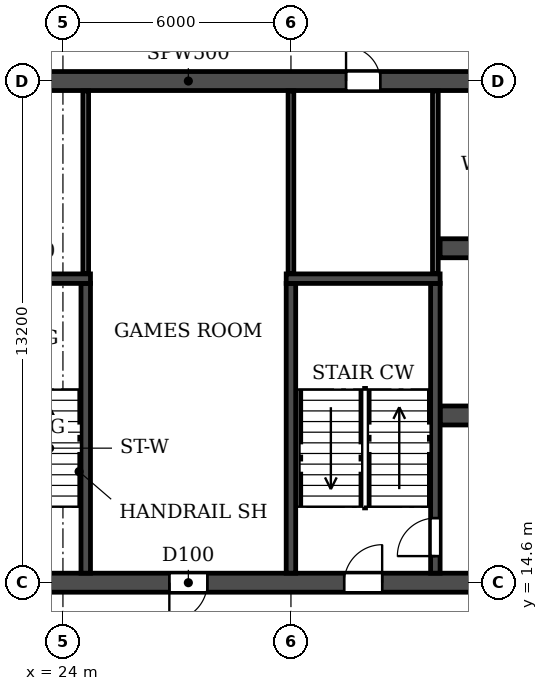
"""IFC4 building model, lengths in metres.
Left out: names, types, materials, properties, quantities, classifications, styles, units other than length and angle.
Written with IfcOpenShell. Run it as: python <this file> out.ifc"""

import sys

from ifc_helpers import new_model, si_unit, direction, frame, frame_2d, origin, place, context, subcontext, project, spatial, rectangle, extrude, element, fill, save


model = new_model("IFC4")
c1 = context("Model", 3, precision=1e-05, world=origin(), true_north=direction((0.0, 1.0)))
c2 = subcontext(c1, "Body", "Model", "MODEL_VIEW")
j1 = project(units=[si_unit("LENGTHUNIT", "METRE"), si_unit("PLANEANGLEUNIT", "RADIAN")], contexts=[c1])
p1 = place(None, origin())
s1 = spatial("IfcSite", under=j1, at=p1, CompositionType="ELEMENT")
p2 = place(p1, origin())
s2 = spatial("IfcBuilding", under=s1, at=p2, CompositionType="ELEMENT")
p3 = place(p2, frame((0.0, 0.0, 82.8)))
s3 = spatial("IfcBuildingStorey", under=s2, at=p3, CompositionType="ELEMENT", Elevation=82.8)
p4 = place(p3, frame((8.6, 14.6, 0.0), z_axis=(0.0, 0.0, 1.0), x_axis=(1.0, 0.0, 0.0)))
e1 = element("IfcWall", 1, at=p4, inside=s3, PredefinedType="SOLIDWALL", context=c2, shape_type="SweptSolid", body=[
    extrude(rectangle(XDim=84.8, YDim=0.5, at=frame_2d((42.4, 0.0))), origin(), (0.0, 0.0, 1.0), 3.06),
])
p5 = place(p4, frame((1.2, 0.0, 0.0)))
e2 = element("IfcOpeningElement", 2, at=p5, cuts=e1, PredefinedType="OPENING", context=c2, shape_type="SweptSolid", body=[
    extrude(rectangle(XDim=1.0, YDim=2.1, at=frame_2d((0.5, 1.05))), frame((0.0, 0.26, 0.0), z_axis=(0.0, -1.0, 0.0), x_axis=(1.0, 0.0, 0.0)), (0.0, 0.0, 1.0), 0.52),
])
p6 = place(p4, frame((5.9, 0.0, 0.0)))
e3 = element("IfcOpeningElement", 3, at=p6, cuts=e1, PredefinedType="OPENING", context=c2, shape_type="SweptSolid", body=[
    extrude(rectangle(XDim=1.0, YDim=2.1, at=frame_2d((0.5, 1.05))), frame((0.0, 0.26, 0.0), z_axis=(0.0, -1.0, 0.0), x_axis=(1.0, 0.0, 0.0)), (0.0, 0.0, 1.0), 0.52),
])
p7 = place(p4, frame((10.3, 0.0, 0.0)))
e4 = element("IfcOpeningElement", 4, at=p7, cuts=e1, PredefinedType="OPENING", context=c2, shape_type="SweptSolid", body=[
    extrude(rectangle(XDim=1.0, YDim=2.1, at=frame_2d((0.5, 1.05))), frame((0.0, 0.26, 0.0), z_axis=(0.0, -1.0, 0.0), x_axis=(1.0, 0.0, 0.0)), (0.0, 0.0, 1.0), 0.52),
])
p8 = place(p4, frame((18.2, 0.0, 0.0)))
e5 = element("IfcOpeningElement", 5, at=p8, cuts=e1, PredefinedType="OPENING", context=c2, shape_type="SweptSolid", body=[
    extrude(rectangle(XDim=1.0, YDim=2.1, at=frame_2d((0.5, 1.05))), frame((0.0, 0.26, 0.0), z_axis=(0.0, -1.0, 0.0), x_axis=(1.0, 0.0, 0.0)), (0.0, 0.0, 1.0), 0.52),
])
p9 = place(p4, frame((22.8, 0.0, 0.0)))
e6 = element("IfcOpeningElement", 6, at=p9, cuts=e1, PredefinedType="OPENING", context=c2, shape_type="SweptSolid", body=[
    extrude(rectangle(XDim=1.0, YDim=2.1, at=frame_2d((0.5, 1.05))), frame((0.0, 0.26, 0.0), z_axis=(0.0, -1.0, 0.0), x_axis=(1.0, 0.0, 0.0)), (0.0, 0.0, 1.0), 0.52),
])
p10 = place(p4, frame((36.7, 0.0, 0.0)))
e7 = element("IfcOpeningElement", 7, at=p10, cuts=e1, PredefinedType="OPENING", context=c2, shape_type="SweptSolid", body=[
    extrude(rectangle(XDim=1.0, YDim=2.1, at=frame_2d((0.5, 1.05))), frame((0.0, 0.26, 0.0), z_axis=(0.0, -1.0, 0.0), x_axis=(1.0, 0.0, 0.0)), (0.0, 0.0, 1.0), 0.52),
])
p11 = place(p4, frame((41.9, 0.0, 0.0)))
e8 = element("IfcOpeningElement", 8, at=p11, cuts=e1, PredefinedType="OPENING", context=c2, shape_type="SweptSolid", body=[
    extrude(rectangle(XDim=1.0, YDim=2.1, at=frame_2d((0.5, 1.05))), frame((0.0, 0.26, 0.0), z_axis=(0.0, -1.0, 0.0), x_axis=(1.0, 0.0, 0.0)), (0.0, 0.0, 1.0), 0.52),
])
p12 = place(p4, frame((44.5, 0.0, 0.0)))
e9 = element("IfcOpeningElement", 9, at=p12, cuts=e1, PredefinedType="OPENING", context=c2, shape_type="SweptSolid", body=[
    extrude(rectangle(XDim=1.0, YDim=2.1, at=frame_2d((0.5, 1.05))), frame((0.0, 0.26, 0.0), z_axis=(0.0, -1.0, 0.0), x_axis=(1.0, 0.0, 0.0)), (0.0, 0.0, 1.0), 0.52),
])
p13 = place(p4, frame((48.4, 0.0, 0.0)))
e10 = element("IfcOpeningElement", 10, at=p13, cuts=e1, PredefinedType="OPENING", context=c2, shape_type="SweptSolid", body=[
    extrude(rectangle(XDim=1.0, YDim=2.1, at=frame_2d((0.5, 1.05))), frame((0.0, 0.26, 0.0), z_axis=(0.0, -1.0, 0.0), x_axis=(1.0, 0.0, 0.0)), (0.0, 0.0, 1.0), 0.52),
])
p14 = place(p4, frame((61.0, 0.0, 0.0)))
e11 = element("IfcOpeningElement", 11, at=p14, cuts=e1, PredefinedType="OPENING", context=c2, shape_type="SweptSolid", body=[
    extrude(rectangle(XDim=1.0, YDim=2.1, at=frame_2d((0.5, 1.05))), frame((0.0, 0.26, 0.0), z_axis=(0.0, -1.0, 0.0), x_axis=(1.0, 0.0, 0.0)), (0.0, 0.0, 1.0), 0.52),
])
p15 = place(p4, frame((65.6, 0.0, 0.0)))
e12 = element("IfcOpeningElement", 12, at=p15, cuts=e1, PredefinedType="OPENING", context=c2, shape_type="SweptSolid", body=[
    extrude(rectangle(XDim=1.0, YDim=2.1, at=frame_2d((0.5, 1.05))), frame((0.0, 0.26, 0.0), z_axis=(0.0, -1.0, 0.0), x_axis=(1.0, 0.0, 0.0)), (0.0, 0.0, 1.0), 0.52),
])
p16 = place(p4, frame((73.5, 0.0, 0.0)))
e13 = element("IfcOpeningElement", 13, at=p16, cuts=e1, PredefinedType="OPENING", context=c2, shape_type="SweptSolid", body=[
    extrude(rectangle(XDim=1.0, YDim=2.1, at=frame_2d((0.5, 1.05))), frame((0.0, 0.26, 0.0), z_axis=(0.0, -1.0, 0.0), x_axis=(1.0, 0.0, 0.0)), (0.0, 0.0, 1.0), 0.52),
])
p17 = place(p4, frame((77.3, 0.0, 0.0)))
e14 = element("IfcOpeningElement", 14, at=p17, cuts=e1, PredefinedType="OPENING", context=c2, shape_type="SweptSolid", body=[
    extrude(rectangle(XDim=1.0, YDim=2.1, at=frame_2d((0.5, 1.05))), frame((0.0, 0.26, 0.0), z_axis=(0.0, -1.0, 0.0), x_axis=(1.0, 0.0, 0.0)), (0.0, 0.0, 1.0), 0.52),
])
p18 = place(p4, frame((82.0, 0.0, 0.0)))
e15 = element("IfcOpeningElement", 15, at=p18, cuts=e1, PredefinedType="OPENING", context=c2, shape_type="SweptSolid", body=[
    extrude(rectangle(XDim=1.0, YDim=2.1, at=frame_2d((0.5, 1.05))), frame((0.0, 0.26, 0.0), z_axis=(0.0, -1.0, 0.0), x_axis=(1.0, 0.0, 0.0)), (0.0, 0.0, 1.0), 0.52),
])
p19 = place(p3, frame((8.6, 27.8, 0.0), z_axis=(0.0, 0.0, 1.0), x_axis=(1.0, 0.0, 0.0)))
e16 = element("IfcWall", 16, at=p19, inside=s3, PredefinedType="SOLIDWALL", context=c2, shape_type="SweptSolid", body=[
    extrude(rectangle(XDim=84.8, YDim=0.5, at=frame_2d((42.4, 0.0))), origin(), (0.0, 0.0, 1.0), 3.06),
])
p20 = place(p19, frame((2.55, 0.0, 0.0)))
e17 = element("IfcOpeningElement", 17, at=p20, cuts=e16, PredefinedType="OPENING", context=c2, shape_type="SweptSolid", body=[
    extrude(rectangle(XDim=1.0, YDim=2.1, at=frame_2d((0.5, 1.05))), frame((0.0, 0.26, 0.0), z_axis=(0.0, -1.0, 0.0), x_axis=(1.0, 0.0, 0.0)), (0.0, 0.0, 1.0), 0.52),
])
p21 = place(p19, frame((7.25, 0.0, 0.0)))
e18 = element("IfcOpeningElement", 18, at=p21, cuts=e16, PredefinedType="OPENING", context=c2, shape_type="SweptSolid", body=[
    extrude(rectangle(XDim=1.0, YDim=2.1, at=frame_2d((0.5, 1.05))), frame((0.0, 0.26, 0.0), z_axis=(0.0, -1.0, 0.0), x_axis=(1.0, 0.0, 0.0)), (0.0, 0.0, 1.0), 0.52),
])
p22 = place(p19, frame((10.3, 0.0, 0.0)))
e19 = element("IfcOpeningElement", 19, at=p22, cuts=e16, PredefinedType="OPENING", context=c2, shape_type="SweptSolid", body=[
    extrude(rectangle(XDim=1.0, YDim=2.1, at=frame_2d((0.5, 1.05))), frame((0.0, 0.26, 0.0), z_axis=(0.0, -1.0, 0.0), x_axis=(1.0, 0.0, 0.0)), (0.0, 0.0, 1.0), 0.52),
])
p23 = place(p19, frame((13.65, 0.0, 0.0)))
e20 = element("IfcOpeningElement", 20, at=p23, cuts=e16, PredefinedType="OPENING", context=c2, shape_type="SweptSolid", body=[
    extrude(rectangle(XDim=0.9, YDim=2.1, at=frame_2d((0.45, 1.05))), frame((0.0, 0.26, 0.0), z_axis=(0.0, -1.0, 0.0), x_axis=(1.0, 0.0, 0.0)), (0.0, 0.0, 1.0), 0.52),
])
p24 = place(p19, frame((22.85, 0.0, 0.0)))
e21 = element("IfcOpeningElement", 21, at=p24, cuts=e16, PredefinedType="OPENING", context=c2, shape_type="SweptSolid", body=[
    extrude(rectangle(XDim=0.9, YDim=2.1, at=frame_2d((0.45, 1.05))), frame((0.0, 0.26, 0.0), z_axis=(0.0, -1.0, 0.0), x_axis=(1.0, 0.0, 0.0)), (0.0, 0.0, 1.0), 0.52),
])
p25 = place(p19, frame((27.3, 0.0, 0.0)))
e22 = element("IfcOpeningElement", 22, at=p25, cuts=e16, PredefinedType="OPENING", context=c2, shape_type="SweptSolid", body=[
    extrude(rectangle(XDim=1.0, YDim=2.1, at=frame_2d((0.5, 1.05))), frame((0.0, 0.26, 0.0), z_axis=(0.0, -1.0, 0.0), x_axis=(1.0, 0.0, 0.0)), (0.0, 0.0, 1.0), 0.52),
])
p26 = place(p19, frame((32.25, 0.0, 0.0)))
e23 = element("IfcOpeningElement", 23, at=p26, cuts=e16, PredefinedType="OPENING", context=c2, shape_type="SweptSolid", body=[
    extrude(rectangle(XDim=1.5, YDim=2.1, at=frame_2d((0.75, 1.05))), frame((0.0, 0.26, 0.0), z_axis=(0.0, -1.0, 0.0), x_axis=(1.0, 0.0, 0.0)), (0.0, 0.0, 1.0), 0.52),
])
p27 = place(p19, frame((39.0, 0.0, 0.0)))
e24 = element("IfcOpeningElement", 24, at=p27, cuts=e16, PredefinedType="OPENING", context=c2, shape_type="SweptSolid", body=[
    extrude(rectangle(XDim=1.0, YDim=2.1, at=frame_2d((0.5, 1.05))), frame((0.0, 0.26, 0.0), z_axis=(0.0, -1.0, 0.0), x_axis=(1.0, 0.0, 0.0)), (0.0, 0.0, 1.0), 0.52),
])
p28 = place(p19, frame((41.9, 0.0, 0.0)))
e25 = element("IfcOpeningElement", 25, at=p28, cuts=e16, PredefinedType="OPENING", context=c2, shape_type="SweptSolid", body=[
    extrude(rectangle(XDim=1.0, YDim=2.1, at=frame_2d((0.5, 1.05))), frame((0.0, 0.26, 0.0), z_axis=(0.0, -1.0, 0.0), x_axis=(1.0, 0.0, 0.0)), (0.0, 0.0, 1.0), 0.52),
])
p29 = place(p19, frame((47.4, 0.0, 0.0)))
e26 = element("IfcOpeningElement", 26, at=p29, cuts=e16, PredefinedType="OPENING", context=c2, shape_type="SweptSolid", body=[
    extrude(rectangle(XDim=1.0, YDim=2.1, at=frame_2d((0.5, 1.05))), frame((0.0, 0.26, 0.0), z_axis=(0.0, -1.0, 0.0), x_axis=(1.0, 0.0, 0.0)), (0.0, 0.0, 1.0), 0.52),
])
p30 = place(p19, frame((52.6, 0.0, 0.0)))
e27 = element("IfcOpeningElement", 27, at=p30, cuts=e16, PredefinedType="OPENING", context=c2, shape_type="SweptSolid", body=[
    extrude(rectangle(XDim=1.0, YDim=2.1, at=frame_2d((0.5, 1.05))), frame((0.0, 0.26, 0.0), z_axis=(0.0, -1.0, 0.0), x_axis=(1.0, 0.0, 0.0)), (0.0, 0.0, 1.0), 0.52),
])
p31 = place(p19, frame((56.5, 0.0, 0.0)))
e28 = element("IfcOpeningElement", 28, at=p31, cuts=e16, PredefinedType="OPENING", context=c2, shape_type="SweptSolid", body=[
    extrude(rectangle(XDim=1.0, YDim=2.1, at=frame_2d((0.5, 1.05))), frame((0.0, 0.26, 0.0), z_axis=(0.0, -1.0, 0.0), x_axis=(1.0, 0.0, 0.0)), (0.0, 0.0, 1.0), 0.52),
])
p32 = place(p19, frame((61.05, 0.0, 0.0)))
e29 = element("IfcOpeningElement", 29, at=p32, cuts=e16, PredefinedType="OPENING", context=c2, shape_type="SweptSolid", body=[
    extrude(rectangle(XDim=0.9, YDim=2.1, at=frame_2d((0.45, 1.05))), frame((0.0, 0.26, 0.0), z_axis=(0.0, -1.0, 0.0), x_axis=(1.0, 0.0, 0.0)), (0.0, 0.0, 1.0), 0.52),
])
p33 = place(p19, frame((70.25, 0.0, 0.0)))
e30 = element("IfcOpeningElement", 30, at=p33, cuts=e16, PredefinedType="OPENING", context=c2, shape_type="SweptSolid", body=[
    extrude(rectangle(XDim=0.9, YDim=2.1, at=frame_2d((0.45, 1.05))), frame((0.0, 0.26, 0.0), z_axis=(0.0, -1.0, 0.0), x_axis=(1.0, 0.0, 0.0)), (0.0, 0.0, 1.0), 0.52),
])
p34 = place(p19, frame((73.5, 0.0, 0.0)))
e31 = element("IfcOpeningElement", 31, at=p34, cuts=e16, PredefinedType="OPENING", context=c2, shape_type="SweptSolid", body=[
    extrude(rectangle(XDim=1.0, YDim=2.1, at=frame_2d((0.5, 1.05))), frame((0.0, 0.26, 0.0), z_axis=(0.0, -1.0, 0.0), x_axis=(1.0, 0.0, 0.0)), (0.0, 0.0, 1.0), 0.52),
])
p35 = place(p19, frame((76.55, 0.0, 0.0)))
e32 = element("IfcOpeningElement", 32, at=p35, cuts=e16, PredefinedType="OPENING", context=c2, shape_type="SweptSolid", body=[
    extrude(rectangle(XDim=1.0, YDim=2.1, at=frame_2d((0.5, 1.05))), frame((0.0, 0.26, 0.0), z_axis=(0.0, -1.0, 0.0), x_axis=(1.0, 0.0, 0.0)), (0.0, 0.0, 1.0), 0.52),
])
p36 = place(p19, frame((81.25, 0.0, 0.0)))
e33 = element("IfcOpeningElement", 33, at=p36, cuts=e16, PredefinedType="OPENING", context=c2, shape_type="SweptSolid", body=[
    extrude(rectangle(XDim=1.0, YDim=2.1, at=frame_2d((0.5, 1.05))), frame((0.0, 0.26, 0.0), z_axis=(0.0, -1.0, 0.0), x_axis=(1.0, 0.0, 0.0)), (0.0, 0.0, 1.0), 0.52),
])
p37 = place(p3, frame((33.925, 19.0, 0.0), z_axis=(0.0, 0.0, 1.0), x_axis=(1.0, 0.0, 0.0)))
e34 = element("IfcWall", 34, at=p37, inside=s3, PredefinedType="SOLIDWALL", context=c2, shape_type="SweptSolid", body=[
    extrude(rectangle(XDim=34.15, YDim=0.5, at=frame_2d((17.075, 0.0))), origin(), (0.0, 0.0, 1.0), 3.06),
])
p38 = place(p37, frame((16.175, 0.0, 0.0)))
e35 = element("IfcOpeningElement", 35, at=p38, cuts=e34, PredefinedType="OPENING", context=c2, shape_type="SweptSolid", body=[
    extrude(rectangle(XDim=1.8, YDim=2.1, at=frame_2d((0.9, 1.05))), frame((0.0, 0.26, 0.0), z_axis=(0.0, -1.0, 0.0), x_axis=(1.0, 0.0, 0.0)), (0.0, 0.0, 1.0), 0.52),
])
p39 = place(p37, frame((1.525, 0.0, 0.0)))
e36 = element("IfcOpeningElement", 36, at=p39, cuts=e34, PredefinedType="OPENING", context=c2, shape_type="SweptSolid", body=[
    extrude(rectangle(XDim=1.8, YDim=2.1, at=frame_2d((0.9, 1.05))), frame((0.0, 0.26, 0.0), z_axis=(0.0, -1.0, 0.0), x_axis=(1.0, 0.0, 0.0)), (0.0, 0.0, 1.0), 0.52),
])
p40 = place(p37, frame((8.725, 0.0, 0.0)))
e37 = element("IfcOpeningElement", 37, at=p40, cuts=e34, PredefinedType="OPENING", context=c2, shape_type="SweptSolid", body=[
    extrude(rectangle(XDim=1.1, YDim=2.1, at=frame_2d((0.55, 1.05))), frame((0.0, 0.26, 0.0), z_axis=(0.0, -1.0, 0.0), x_axis=(1.0, 0.0, 0.0)), (0.0, 0.0, 1.0), 0.52),
])
p41 = place(p37, frame((11.325, 0.0, 0.0)))
e38 = element("IfcOpeningElement", 38, at=p41, cuts=e34, PredefinedType="OPENING", context=c2, shape_type="SweptSolid", body=[
    extrude(rectangle(XDim=1.1, YDim=2.1, at=frame_2d((0.55, 1.05))), frame((0.0, 0.26, 0.0), z_axis=(0.0, -1.0, 0.0), x_axis=(1.0, 0.0, 0.0)), (0.0, 0.0, 1.0), 0.52),
])
p42 = place(p37, frame((13.925, 0.0, 0.0)))
e39 = element("IfcOpeningElement", 39, at=p42, cuts=e34, PredefinedType="OPENING", context=c2, shape_type="SweptSolid", body=[
    extrude(rectangle(XDim=1.1, YDim=2.1, at=frame_2d((0.55, 1.05))), frame((0.0, 0.26, 0.0), z_axis=(0.0, -1.0, 0.0), x_axis=(1.0, 0.0, 0.0)), (0.0, 0.0, 1.0), 0.52),
])
p43 = place(p37, frame((19.125, 0.0, 0.0)))
e40 = element("IfcOpeningElement", 40, at=p43, cuts=e34, PredefinedType="OPENING", context=c2, shape_type="SweptSolid", body=[
    extrude(rectangle(XDim=1.1, YDim=2.1, at=frame_2d((0.55, 1.05))), frame((0.0, 0.26, 0.0), z_axis=(0.0, -1.0, 0.0), x_axis=(1.0, 0.0, 0.0)), (0.0, 0.0, 1.0), 0.52),
])
p44 = place(p37, frame((21.725, 0.0, 0.0)))
e41 = element("IfcOpeningElement", 41, at=p44, cuts=e34, PredefinedType="OPENING", context=c2, shape_type="SweptSolid", body=[
    extrude(rectangle(XDim=1.1, YDim=2.1, at=frame_2d((0.55, 1.05))), frame((0.0, 0.26, 0.0), z_axis=(0.0, -1.0, 0.0), x_axis=(1.0, 0.0, 0.0)), (0.0, 0.0, 1.0), 0.52),
])
p45 = place(p37, frame((24.325, 0.0, 0.0)))
e42 = element("IfcOpeningElement", 42, at=p45, cuts=e34, PredefinedType="OPENING", context=c2, shape_type="SweptSolid", body=[
    extrude(rectangle(XDim=1.1, YDim=2.1, at=frame_2d((0.55, 1.05))), frame((0.0, 0.26, 0.0), z_axis=(0.0, -1.0, 0.0), x_axis=(1.0, 0.0, 0.0)), (0.0, 0.0, 1.0), 0.52),
])
p46 = place(p37, frame((30.825, 0.0, 0.0)))
e43 = element("IfcOpeningElement", 43, at=p46, cuts=e34, PredefinedType="OPENING", context=c2, shape_type="SweptSolid", body=[
    extrude(rectangle(XDim=1.8, YDim=2.1, at=frame_2d((0.9, 1.05))), frame((0.0, 0.26, 0.0), z_axis=(0.0, -1.0, 0.0), x_axis=(1.0, 0.0, 0.0)), (0.0, 0.0, 1.0), 0.52),
])
p47 = place(p3, frame((33.925, 23.4, 0.0), z_axis=(0.0, 0.0, 1.0), x_axis=(1.0, 0.0, 0.0)))
e44 = element("IfcWall", 44, at=p47, inside=s3, PredefinedType="SOLIDWALL", context=c2, shape_type="SweptSolid", body=[
    extrude(rectangle(XDim=34.15, YDim=0.5, at=frame_2d((17.075, 0.0))), origin(), (0.0, 0.0, 1.0), 3.06),
])
p48 = place(p47, frame((16.175, 0.0, 0.0)))
e45 = element("IfcOpeningElement", 45, at=p48, cuts=e44, PredefinedType="OPENING", context=c2, shape_type="SweptSolid", body=[
    extrude(rectangle(XDim=1.8, YDim=2.1, at=frame_2d((0.9, 1.05))), frame((0.0, 0.26, 0.0), z_axis=(0.0, -1.0, 0.0), x_axis=(1.0, 0.0, 0.0)), (0.0, 0.0, 1.0), 0.52),
])
p49 = place(p47, frame((11.025, 0.0, 0.0)))
e46 = element("IfcOpeningElement", 46, at=p49, cuts=e44, PredefinedType="OPENING", context=c2, shape_type="SweptSolid", body=[
    extrude(rectangle(XDim=1.1, YDim=2.1, at=frame_2d((0.55, 1.05))), frame((0.0, 0.26, 0.0), z_axis=(0.0, -1.0, 0.0), x_axis=(1.0, 0.0, 0.0)), (0.0, 0.0, 1.0), 0.52),
])
p50 = place(p3, frame((30.0, 14.85, 0.0), z_axis=(0.0, 0.0, 1.0), x_axis=(0.0, 1.0, 0.0)))
e47 = element("IfcWall", 47, at=p50, inside=s3, PredefinedType="SOLIDWALL", context=c2, shape_type="SweptSolid", body=[
    extrude(rectangle(XDim=7.625, YDim=0.25, at=frame_2d((3.812, 0.0))), origin(), (0.0, 0.0, 1.0), 3.06),
])
p51 = place(p3, frame((33.8, 14.85, 0.0), z_axis=(0.0, 0.0, 1.0), x_axis=(0.0, 1.0, 0.0)))
e48 = element("IfcWall", 48, at=p51, inside=s3, PredefinedType="SOLIDWALL", context=c2, shape_type="SweptSolid", body=[
    extrude(rectangle(XDim=7.625, YDim=0.25, at=frame_2d((3.812, 0.0))), origin(), (0.0, 0.0, 1.0), 3.06),
])
p52 = place(p51, frame((0.45, 0.0, 0.0)))
e49 = element("IfcOpeningElement", 49, at=p52, cuts=e48, PredefinedType="OPENING", context=c2, shape_type="SweptSolid", body=[
    extrude(rectangle(XDim=1.0, YDim=2.1, at=frame_2d((0.5, 1.05))), frame((0.0, 0.135, 0.0), z_axis=(0.0, -1.0, 0.0), x_axis=(1.0, 0.0, 0.0)), (0.0, 0.0, 1.0), 0.27),
])
p53 = place(p3, frame((29.875, 22.6, 0.0), z_axis=(0.0, 0.0, 1.0), x_axis=(1.0, 0.0, 0.0)))
e50 = element("IfcWall", 50, at=p53, inside=s3, PredefinedType="SOLIDWALL", context=c2, shape_type="SweptSolid", body=[
    extrude(rectangle(XDim=4.05, YDim=0.25, at=frame_2d((2.025, 0.0))), origin(), (0.0, 0.0, 1.0), 3.06),
])
p54 = place(p3, frame((24.6, 14.85, 0.0), z_axis=(0.0, 0.0, 1.0), x_axis=(0.0, 1.0, 0.0)))
e51 = element("IfcWall", 51, at=p54, inside=s3, PredefinedType="SOLIDWALL", context=c2, shape_type="SweptSolid", body=[
    extrude(rectangle(XDim=7.625, YDim=0.25, at=frame_2d((3.812, 0.0))), origin(), (0.0, 0.0, 1.0), 3.06),
])
p55 = place(p3, frame((20.675, 22.6, 0.0), z_axis=(0.0, 0.0, 1.0), x_axis=(1.0, 0.0, 0.0)))
e52 = element("IfcWall", 52, at=p55, inside=s3, PredefinedType="SOLIDWALL", context=c2, shape_type="SweptSolid", body=[
    extrude(rectangle(XDim=4.05, YDim=0.25, at=frame_2d((2.025, 0.0))), origin(), (0.0, 0.0, 1.0), 3.06),
])
for number, where, z_axis, x_axis in (
    (53, (24.6, 22.735, 0.0), (0.0, 0.0, 1.0), (0.0, 1.0, 0.0)),
    (54, (30.0, 22.735, 0.0), (0.0, 0.0, 1.0), (0.0, 1.0, 0.0)),
    (55, (33.8, 22.735, 0.0), (0.0, 0.0, 1.0), (0.0, 1.0, 0.0)),
):
    element("IfcWall", number, at=place(p3, frame(where, z_axis=z_axis, x_axis=x_axis)), inside=s3, PredefinedType="PARTITIONING", context=c2, shape_type="SweptSolid", body=[
        extrude(rectangle(XDim=4.805, YDim=0.15, at=frame_2d((2.402, 0.0))), origin(), (0.0, 0.0, 1.0), 3.06),
    ])
p56 = place(p24, origin())
e56 = element("IfcDoor", 56, at=p56, inside=s3, OperationType="SINGLE_SWING_LEFT", PredefinedType="DOOR", context=c2, shape_type="SweptSolid", body=[
    extrude(rectangle(XDim=0.9, YDim=2.1, at=frame_2d((0.45, 1.05))), frame((0.0, 0.025, 0.0), z_axis=(0.0, -1.0, 0.0), x_axis=(1.0, 0.0, 0.0)), (0.0, 0.0, 1.0), 0.05),
])
fill(e21, e56)
p57 = place(p8, frame((1.0, 0.0, 0.0), z_axis=(0.0, 0.0, 1.0), x_axis=(-1.0, 0.0, 0.0)))
e57 = element("IfcDoor", 57, at=p57, inside=s3, OperationType="SINGLE_SWING_RIGHT", PredefinedType="DOOR", context=c2, shape_type="SweptSolid", body=[
    extrude(rectangle(XDim=1.0, YDim=2.1, at=frame_2d((0.5, 1.05))), frame((0.0, 0.025, 0.0), z_axis=(0.0, -1.0, 0.0), x_axis=(1.0, 0.0, 0.0)), (0.0, 0.0, 1.0), 0.05),
])
fill(e5, e57)
p58 = place(p9, origin())
e58 = element("IfcDoor", 58, at=p58, inside=s3, OperationType="SINGLE_SWING_RIGHT", PredefinedType="DOOR", context=c2, shape_type="SweptSolid", body=[
    extrude(rectangle(XDim=1.0, YDim=2.1, at=frame_2d((0.5, 1.05))), frame((0.0, 0.025, 0.0), z_axis=(0.0, -1.0, 0.0), x_axis=(1.0, 0.0, 0.0)), (0.0, 0.0, 1.0), 0.05),
])
fill(e6, e58)
p59 = place(p52, origin())
e59 = element("IfcDoor", 59, at=p59, inside=s3, OperationType="SINGLE_SWING_LEFT", PredefinedType="DOOR", context=c2, shape_type="SweptSolid", body=[
    extrude(rectangle(XDim=1.0, YDim=2.1, at=frame_2d((0.5, 1.05))), frame((0.0, 0.025, 0.0), z_axis=(0.0, -1.0, 0.0), x_axis=(1.0, 0.0, 0.0)), (0.0, 0.0, 1.0), 0.05),
])
fill(e49, e59)
save(model, sys.argv[1])
